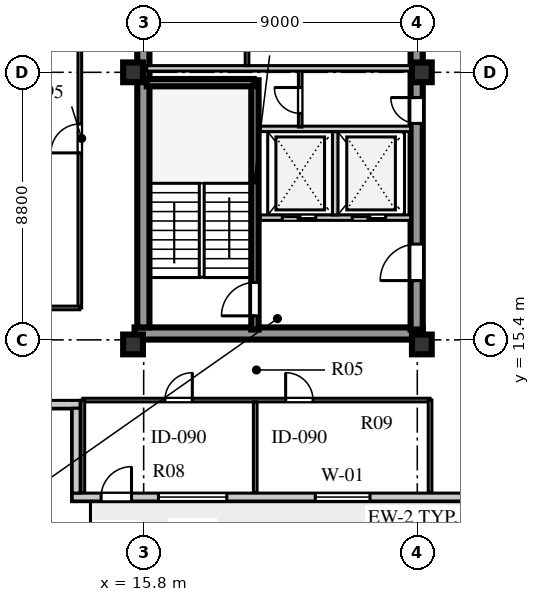
"""IFC4 building model, lengths in metres.
Left out: names, types, materials, properties, quantities, classifications, styles, units other than length and angle.
Written with IfcOpenShell. Run it as: python <this file> out.ifc"""

import sys

from ifc_helpers import new_model, si_unit, direction, frame, frame_2d, origin, origin_2d, place, context, subcontext, project, spatial, rectangle, extrude, element, fill, save


model = new_model("IFC4")
c1 = context("Model", 3, precision=1e-05, world=origin(), true_north=direction((0.0, 1.0)))
c2 = subcontext(c1, "Body", "Model", "MODEL_VIEW")
j1 = project(units=[si_unit("LENGTHUNIT", "METRE"), si_unit("PLANEANGLEUNIT", "RADIAN")], contexts=[c1])
p1 = place(None, origin())
s1 = spatial("IfcSite", under=j1, at=p1, CompositionType="ELEMENT")
p2 = place(p1, origin())
s2 = spatial("IfcBuilding", under=s1, at=p2, CompositionType="ELEMENT")
p3 = place(p2, frame((0.0, 0.0, 288.2)))
s3 = spatial("IfcBuildingStorey", under=s2, at=p3, CompositionType="ELEMENT", Elevation=288.2)
p4 = place(p3, frame((15.5, 15.61, 0.0), z_axis=(0.0, 0.0, 1.0), x_axis=(1.0, 0.0, 0.0)))
e1 = element("IfcWall", 1, at=p4, inside=s3, PredefinedType="SHEAR", context=c2, shape_type="SweptSolid", body=[
    extrude(rectangle(XDim=9.48, YDim=0.4, at=frame_2d((4.74, 0.0))), origin(), (0.0, 0.0, 1.0), 3.66),
])
p5 = place(p3, frame((15.79, 15.81, 0.0), z_axis=(0.0, 0.0, 1.0), x_axis=(0.0, 1.0, 0.0)))
e2 = element("IfcWall", 2, at=p5, inside=s3, PredefinedType="SHEAR", context=c2, shape_type="SweptSolid", body=[
    extrude(rectangle(XDim=25.63, YDim=0.4, at=frame_2d((12.815, 0.0))), origin(), (0.0, 0.0, 1.0), 3.66),
])
p6 = place(p3, frame((24.78, 15.74, 0.0), z_axis=(0.0, 0.0, 1.0), x_axis=(0.0, 1.0, 0.0)))
e3 = element("IfcWall", 3, at=p6, inside=s3, PredefinedType="SHEAR", context=c2, shape_type="SweptSolid", body=[
    extrude(rectangle(XDim=25.76, YDim=0.4, at=frame_2d((12.88, 0.0))), origin(), (0.0, 0.0, 1.0), 3.66),
])
p7 = place(p6, frame((1.61, 0.0, 0.0)))
e4 = element("IfcOpeningElement", 4, at=p7, cuts=e3, PredefinedType="OPENING", context=c2, shape_type="SweptSolid", body=[
    extrude(rectangle(XDim=1.2, YDim=2.1, at=frame_2d((0.6, 1.05))), frame((0.0, 0.21, 0.0), z_axis=(0.0, -1.0, 0.0), x_axis=(1.0, 0.0, 0.0)), (0.0, 0.0, 1.0), 0.42),
])
p8 = place(p6, frame((6.78, 0.0, 0.0)))
e5 = element("IfcOpeningElement", 5, at=p8, cuts=e3, PredefinedType="OPENING", context=c2, shape_type="SweptSolid", body=[
    extrude(rectangle(XDim=0.85, YDim=2.06, at=frame_2d((0.425, 1.03))), frame((0.0, 0.21, 0.0), z_axis=(0.0, -1.0, 0.0), x_axis=(1.0, 0.0, 0.0)), (0.0, 0.0, 1.0), 0.42),
])
p9 = place(p6, frame((12.11, 0.0, 0.0)))
e6 = element("IfcOpeningElement", 6, at=p9, cuts=e3, PredefinedType="OPENING", context=c2, shape_type="SweptSolid", body=[
    extrude(rectangle(XDim=1.5, YDim=2.12, at=frame_2d((0.75, 1.06))), frame((0.0, 0.21, 0.0), z_axis=(0.0, -1.0, 0.0), x_axis=(1.0, 0.0, 0.0)), (0.0, 0.0, 1.0), 0.42),
])
p10 = place(p6, frame((20.11, 0.0, 0.0)))
e7 = element("IfcOpeningElement", 7, at=p10, cuts=e3, PredefinedType="OPENING", context=c2, shape_type="SweptSolid", body=[
    extrude(rectangle(XDim=1.2, YDim=2.12, at=frame_2d((0.6, 1.06))), frame((0.0, 0.21, 0.0), z_axis=(0.0, -1.0, 0.0), x_axis=(1.0, 0.0, 0.0)), (0.0, 0.0, 1.0), 0.42),
])
p11 = place(p6, frame((24.01, 0.0, 0.0)))
e8 = element("IfcOpeningElement", 8, at=p11, cuts=e3, PredefinedType="OPENING", context=c2, shape_type="SweptSolid", body=[
    extrude(rectangle(XDim=0.95, YDim=2.1, at=frame_2d((0.475, 1.05))), frame((0.0, 0.21, 0.0), z_axis=(0.0, -1.0, 0.0), x_axis=(1.0, 0.0, 0.0)), (0.0, 0.0, 1.0), 0.42),
])
for number, where, z_axis, x_axis in (
    (9, (15.45, 15.25, 0.0), (0.0, 0.0, 1.0), (1.0, 0.0, 0.0)),
    (10, (15.45, 24.2, 0.0), (0.0, 0.0, 1.0), (1.0, 0.0, 0.0)),
    (11, (24.95, 15.25, 0.0), (0.0, 0.0, 1.0), (1.0, 0.0, 0.0)),
    (12, (24.95, 24.2, 0.0), (0.0, 0.0, 1.0), (1.0, 0.0, 0.0)),
):
    element("IfcColumn", number, at=place(p3, frame(where, z_axis=z_axis, x_axis=x_axis)), inside=s3, PredefinedType="COLUMN", context=c2, shape_type="SweptSolid", body=[
        extrude(rectangle(XDim=0.65, YDim=0.65, at=origin_2d()), origin(), (0.0, 0.0, 1.0), 3.66),
    ])
p12 = place(p3, frame((13.45, 10.23, 0.0), z_axis=(0.0, 0.0, 1.0), x_axis=(1.0, 0.0, 0.0)))
e13 = element("IfcWall", 13, at=p12, inside=s3, PredefinedType="SOLIDWALL", context=c2, shape_type="SweptSolid", body=[
    extrude(rectangle(XDim=31.7, YDim=0.26, at=frame_2d((15.85, 0.0))), origin(), (0.0, 0.0, 1.0), 3.66),
])
p13 = place(p12, frame((0.95, 0.0, 0.0)))
e14 = element("IfcOpeningElement", 14, at=p13, cuts=e13, PredefinedType="OPENING", context=c2, shape_type="SweptSolid", body=[
    extrude(rectangle(XDim=1.0, YDim=2.05, at=frame_2d((0.5, 1.025))), frame((0.0, 0.14, 0.0), z_axis=(0.0, -1.0, 0.0), x_axis=(1.0, 0.0, 0.0)), (0.0, 0.0, 1.0), 0.28),
])
p14 = place(p12, frame((2.835, 0.0, 0.8)))
e15 = element("IfcOpeningElement", 15, at=p14, cuts=e13, PredefinedType="OPENING", context=c2, shape_type="SweptSolid", body=[
    extrude(rectangle(XDim=2.25, YDim=2.0, at=frame_2d((1.125, 1.0))), frame((0.0, 0.14, 0.0), z_axis=(0.0, -1.0, 0.0), x_axis=(1.0, 0.0, 0.0)), (0.0, 0.0, 1.0), 0.28),
])
p15 = place(p12, frame((7.995, 0.0, 0.8)))
e16 = element("IfcOpeningElement", 16, at=p15, cuts=e13, PredefinedType="OPENING", context=c2, shape_type="SweptSolid", body=[
    extrude(rectangle(XDim=1.8, YDim=2.0, at=frame_2d((0.9, 1.0))), frame((0.0, 0.14, 0.0), z_axis=(0.0, -1.0, 0.0), x_axis=(1.0, 0.0, 0.0)), (0.0, 0.0, 1.0), 0.28),
])
p16 = place(p12, frame((15.073, 0.0, 0.8)))
e17 = element("IfcOpeningElement", 17, at=p16, cuts=e13, PredefinedType="OPENING", context=c2, shape_type="SweptSolid", body=[
    extrude(rectangle(XDim=1.5, YDim=2.0, at=frame_2d((0.75, 1.0))), frame((0.0, 0.14, 0.0), z_axis=(0.0, -1.0, 0.0), x_axis=(1.0, 0.0, 0.0)), (0.0, 0.0, 1.0), 0.28),
])
p17 = place(p12, frame((21.258, 0.0, 0.8)))
e18 = element("IfcOpeningElement", 18, at=p17, cuts=e13, PredefinedType="OPENING", context=c2, shape_type="SweptSolid", body=[
    extrude(rectangle(XDim=1.2, YDim=1.75, at=frame_2d((0.6, 0.875))), frame((0.0, 0.14, 0.0), z_axis=(0.0, -1.0, 0.0), x_axis=(1.0, 0.0, 0.0)), (0.0, 0.0, 1.0), 0.28),
])
p18 = place(p12, frame((27.445, 0.0, 0.8)))
e19 = element("IfcOpeningElement", 19, at=p18, cuts=e13, PredefinedType="OPENING", context=c2, shape_type="SweptSolid", body=[
    extrude(rectangle(XDim=2.4, YDim=2.05, at=frame_2d((1.2, 1.025))), frame((0.0, 0.14, 0.0), z_axis=(0.0, -1.0, 0.0), x_axis=(1.0, 0.0, 0.0)), (0.0, 0.0, 1.0), 0.28),
])
p19 = place(p3, frame((10.4, 13.28, 0.0), z_axis=(0.0, 0.0, 1.0), x_axis=(1.0, 0.0, 0.0)))
e20 = element("IfcWall", 20, at=p19, inside=s3, PredefinedType="SOLIDWALL", context=c2, shape_type="SweptSolid", body=[
    extrude(rectangle(XDim=3.31, YDim=0.26, at=frame_2d((1.655, 0.0))), origin(), (0.0, 0.0, 1.0), 3.66),
])
p20 = place(p3, frame((13.58, 13.15, 0.0), z_axis=(0.0, 0.0, 1.0), x_axis=(0.0, -1.0, 0.0)))
e21 = element("IfcWall", 21, at=p20, inside=s3, PredefinedType="SOLIDWALL", context=c2, shape_type="SweptSolid", body=[
    extrude(rectangle(XDim=2.79, YDim=0.26, at=frame_2d((1.395, 0.0))), origin(), (0.0, 0.0, 1.0), 3.66),
])
p21 = place(p3, frame((19.46, 15.74, 0.0), z_axis=(0.0, 0.0, 1.0), x_axis=(0.0, 1.0, 0.0)))
e22 = element("IfcWall", 22, at=p21, inside=s3, PredefinedType="SHEAR", context=c2, shape_type="SweptSolid", body=[
    extrude(rectangle(XDim=8.2, YDim=0.24, at=frame_2d((4.1, 0.0))), origin(), (0.0, 0.0, 1.0), 3.9),
])
p22 = place(p21, frame((0.45, 0.0, 0.0)))
e23 = element("IfcOpeningElement", 23, at=p22, cuts=e22, PredefinedType="OPENING", context=c2, shape_type="SweptSolid", body=[
    extrude(rectangle(XDim=1.1, YDim=2.1, at=frame_2d((0.55, 1.05))), frame((0.0, 0.13, 0.0), z_axis=(0.0, -1.0, 0.0), x_axis=(1.0, 0.0, 0.0)), (0.0, 0.0, 1.0), 0.26),
])
p23 = place(p3, frame((15.9, 23.86, 0.0), z_axis=(0.0, 0.0, 1.0), x_axis=(1.0, 0.0, 0.0)))
e24 = element("IfcWall", 24, at=p23, inside=s3, PredefinedType="SHEAR", context=c2, shape_type="SweptSolid", body=[
    extrude(rectangle(XDim=3.52, YDim=0.24, at=frame_2d((1.76, 0.0))), origin(), (0.0, 0.0, 1.0), 3.9),
])
p24 = place(p3, frame((19.64, 19.42, 0.0), z_axis=(0.0, 0.0, 1.0), x_axis=(1.0, 0.0, 0.0)))
e25 = element("IfcWall", 25, at=p24, inside=s3, PredefinedType="SOLIDWALL", context=c2, shape_type="SweptSolid", body=[
    extrude(rectangle(XDim=4.94, YDim=0.18, at=frame_2d((2.47, 0.0))), origin(), (0.0, 0.0, 1.0), 3.66),
])
p25 = place(p24, frame((0.72, 0.0, 0.0)))
e26 = element("IfcOpeningElement", 26, at=p25, cuts=e25, PredefinedType="OPENING", context=c2, shape_type="SweptSolid", body=[
    extrude(rectangle(XDim=1.1, YDim=2.1, at=frame_2d((0.55, 1.05))), frame((0.0, 0.1, 0.0), z_axis=(0.0, -1.0, 0.0), x_axis=(1.0, 0.0, 0.0)), (0.0, 0.0, 1.0), 0.2),
])
p26 = place(p24, frame((3.02, 0.0, 0.0)))
e27 = element("IfcOpeningElement", 27, at=p26, cuts=e25, PredefinedType="OPENING", context=c2, shape_type="SweptSolid", body=[
    extrude(rectangle(XDim=1.1, YDim=2.1, at=frame_2d((0.55, 1.05))), frame((0.0, 0.1, 0.0), z_axis=(0.0, -1.0, 0.0), x_axis=(1.0, 0.0, 0.0)), (0.0, 0.0, 1.0), 0.2),
])
p27 = place(p3, frame((22.1, 19.51, 0.0), z_axis=(0.0, 0.0, 1.0), x_axis=(0.0, 1.0, 0.0)))
e28 = element("IfcWall", 28, at=p27, inside=s3, PredefinedType="SOLIDWALL", context=c2, shape_type="SweptSolid", body=[
    extrude(rectangle(XDim=2.74, YDim=0.18, at=frame_2d((1.37, 0.0))), origin(), (0.0, 0.0, 1.0), 3.66),
])
p28 = place(p3, frame((19.64, 22.34, 0.0), z_axis=(0.0, 0.0, 1.0), x_axis=(1.0, 0.0, 0.0)))
e29 = element("IfcWall", 29, at=p28, inside=s3, PredefinedType="SOLIDWALL", context=c2, shape_type="SweptSolid", body=[
    extrude(rectangle(XDim=4.94, YDim=0.18, at=frame_2d((2.47, 0.0))), origin(), (0.0, 0.0, 1.0), 3.66),
])
p29 = place(p3, frame((20.95, 22.4, 0.0), z_axis=(0.0, 0.0, 1.0), x_axis=(0.0, 1.0, 0.0)))
e30 = element("IfcWall", 30, at=p29, inside=s3, PredefinedType="PARTITIONING", context=c2, shape_type="SweptSolid", body=[
    extrude(rectangle(XDim=1.88, YDim=0.12, at=frame_2d((0.94, 0.0))), origin(), (0.0, 0.0, 1.0), 3.66),
])
p30 = place(p29, frame((0.45, 0.0, 0.0)))
e31 = element("IfcOpeningElement", 31, at=p30, cuts=e30, PredefinedType="OPENING", context=c2, shape_type="SweptSolid", body=[
    extrude(rectangle(XDim=0.85, YDim=2.06, at=frame_2d((0.425, 1.03))), frame((0.0, 0.07, 0.0), z_axis=(0.0, -1.0, 0.0), x_axis=(1.0, 0.0, 0.0)), (0.0, 0.0, 1.0), 0.14),
])
p31 = place(p3, frame((15.9, 24.33, 0.0), z_axis=(0.0, 0.0, 1.0), x_axis=(1.0, 0.0, 0.0)))
e32 = element("IfcWall", 32, at=p31, inside=s3, PredefinedType="SOLIDWALL", context=c2, shape_type="SweptSolid", body=[
    extrude(rectangle(XDim=8.68, YDim=0.18, at=frame_2d((4.34, 0.0))), origin(), (0.0, 0.0, 1.0), 3.06),
])
p32 = place(p3, frame((19.2, 24.42, 0.0), z_axis=(0.0, 0.0, 1.0), x_axis=(0.0, 1.0, 0.0)))
e33 = element("IfcWall", 33, at=p32, inside=s3, PredefinedType="PARTITIONING", context=c2, shape_type="SweptSolid", body=[
    extrude(rectangle(XDim=2.02, YDim=0.12, at=frame_2d((1.01, 0.0))), origin(), (0.0, 0.0, 1.0), 3.66),
])
p33 = place(p3, frame((13.8, 13.42, 0.0), z_axis=(0.0, 0.0, 1.0), x_axis=(1.0, 0.0, 0.0)))
e34 = element("IfcWall", 34, at=p33, inside=s3, PredefinedType="PARTITIONING", context=c2, shape_type="SweptSolid", body=[
    extrude(rectangle(XDim=11.42, YDim=0.12, at=frame_2d((5.71, 0.0))), origin(), (0.0, 0.0, 1.0), 3.66),
])
p34 = place(p33, frame((2.7, 0.0, 0.0)))
e35 = element("IfcOpeningElement", 35, at=p34, cuts=e34, PredefinedType="OPENING", context=c2, shape_type="SweptSolid", body=[
    extrude(rectangle(XDim=0.9, YDim=2.08, at=frame_2d((0.45, 1.04))), frame((0.0, 0.07, 0.0), z_axis=(0.0, -1.0, 0.0), x_axis=(1.0, 0.0, 0.0)), (0.0, 0.0, 1.0), 0.14),
])
p35 = place(p33, frame((6.67, 0.0, 0.0)))
e36 = element("IfcOpeningElement", 36, at=p35, cuts=e34, PredefinedType="OPENING", context=c2, shape_type="SweptSolid", body=[
    extrude(rectangle(XDim=0.9, YDim=2.08, at=frame_2d((0.45, 1.04))), frame((0.0, 0.07, 0.0), z_axis=(0.0, -1.0, 0.0), x_axis=(1.0, 0.0, 0.0)), (0.0, 0.0, 1.0), 0.14),
])
p36 = place(p3, frame((13.8, 10.38, 0.0), z_axis=(0.0, 0.0, 1.0), x_axis=(0.0, 1.0, 0.0)))
e37 = element("IfcWall", 37, at=p36, inside=s3, PredefinedType="PARTITIONING", context=c2, shape_type="SweptSolid", body=[
    extrude(rectangle(XDim=3.04, YDim=0.12, at=frame_2d((1.52, 0.0))), origin(), (0.0, 0.0, 1.0), 3.66),
])
p37 = place(p3, frame((25.22, 10.38, 0.0), z_axis=(0.0, 0.0, 1.0), x_axis=(0.0, 1.0, 0.0)))
e38 = element("IfcWall", 38, at=p37, inside=s3, PredefinedType="PARTITIONING", context=c2, shape_type="SweptSolid", body=[
    extrude(rectangle(XDim=3.04, YDim=0.12, at=frame_2d((1.52, 0.0))), origin(), (0.0, 0.0, 1.0), 3.21),
])
p38 = place(p3, frame((19.47, 10.38, 0.0), z_axis=(0.0, 0.0, 1.0), x_axis=(0.0, 1.0, 0.0)))
e39 = element("IfcWall", 39, at=p38, inside=s3, PredefinedType="PARTITIONING", context=c2, shape_type="SweptSolid", body=[
    extrude(rectangle(XDim=2.98, YDim=0.12, at=frame_2d((1.49, 0.0))), origin(), (0.0, 0.0, 1.0), 3.66),
])
p39 = place(p3, frame((13.7, 16.45, 0.0), z_axis=(0.0, 0.0, 1.0), x_axis=(0.0, 1.0, 0.0)))
e40 = element("IfcWall", 40, at=p39, inside=s3, PredefinedType="PARTITIONING", context=c2, shape_type="SweptSolid", body=[
    extrude(rectangle(XDim=24.3, YDim=0.12, at=frame_2d((12.15, 0.0))), origin(), (0.0, 0.0, 1.0), 3.66),
])
p40 = place(p39, frame((5.1, 0.0, 0.0)))
e41 = element("IfcOpeningElement", 41, at=p40, cuts=e40, PredefinedType="OPENING", context=c2, shape_type="SweptSolid", body=[
    extrude(rectangle(XDim=0.95, YDim=2.08, at=frame_2d((0.475, 1.04))), frame((0.0, 0.07, 0.0), z_axis=(0.0, -1.0, 0.0), x_axis=(1.0, 0.0, 0.0)), (0.0, 0.0, 1.0), 0.14),
])
p41 = place(p3, frame((10.68, 16.45, 0.0), z_axis=(0.0, 0.0, 1.0), x_axis=(1.0, 0.0, 0.0)))
e42 = element("IfcWall", 42, at=p41, inside=s3, PredefinedType="PARTITIONING", context=c2, shape_type="SweptSolid", body=[
    extrude(rectangle(XDim=3.02, YDim=0.12, at=frame_2d((1.51, 0.0))), origin(), (0.0, 0.0, 1.0), 3.66),
])
p42 = place(p13, frame((1.0, 0.0, 0.0), z_axis=(0.0, 0.0, 1.0), x_axis=(-1.0, 0.0, 0.0)))
e43 = element("IfcDoor", 43, at=p42, inside=s3, OperationType="SINGLE_SWING_LEFT", PredefinedType="DOOR", context=c2, shape_type="SweptSolid", body=[
    extrude(rectangle(XDim=1.0, YDim=2.05, at=frame_2d((0.5, 1.025))), frame((0.0, 0.025, 0.0), z_axis=(0.0, -1.0, 0.0), x_axis=(1.0, 0.0, 0.0)), (0.0, 0.0, 1.0), 0.05),
])
fill(e14, e43)
p43 = place(p14, origin())
e44 = element("IfcWindow", 44, at=p43, inside=s3, PartitioningType="SINGLE_PANEL", PredefinedType="WINDOW", context=c2, shape_type="SweptSolid", body=[
    extrude(rectangle(XDim=2.25, YDim=2.0, at=frame_2d((1.125, 1.0))), frame((0.0, 0.03, 0.0), z_axis=(0.0, -1.0, 0.0), x_axis=(1.0, 0.0, 0.0)), (0.0, 0.0, 1.0), 0.06),
])
fill(e15, e44)
p44 = place(p15, origin())
e45 = element("IfcWindow", 45, at=p44, inside=s3, PartitioningType="SINGLE_PANEL", PredefinedType="WINDOW", context=c2, shape_type="SweptSolid", body=[
    extrude(rectangle(XDim=1.8, YDim=2.0, at=frame_2d((0.9, 1.0))), frame((0.0, 0.03, 0.0), z_axis=(0.0, -1.0, 0.0), x_axis=(1.0, 0.0, 0.0)), (0.0, 0.0, 1.0), 0.06),
])
fill(e16, e45)
p45 = place(p22, origin())
e46 = element("IfcDoor", 46, at=p45, inside=s3, OperationType="SINGLE_SWING_LEFT", PredefinedType="DOOR", context=c2, shape_type="SweptSolid", body=[
    extrude(rectangle(XDim=1.1, YDim=2.1, at=frame_2d((0.55, 1.05))), frame((0.0, 0.025, 0.0), z_axis=(0.0, -1.0, 0.0), x_axis=(1.0, 0.0, 0.0)), (0.0, 0.0, 1.0), 0.05),
])
fill(e23, e46)
p46 = place(p25, origin())
e47 = element("IfcDoor", 47, at=p46, inside=s3, OperationType="DOUBLE_DOOR_SLIDING", PredefinedType="DOOR", context=c2, shape_type="SweptSolid", body=[
    extrude(rectangle(XDim=1.1, YDim=2.1, at=frame_2d((0.55, 1.05))), frame((0.0, 0.025, 0.0), z_axis=(0.0, -1.0, 0.0), x_axis=(1.0, 0.0, 0.0)), (0.0, 0.0, 1.0), 0.05),
])
fill(e26, e47)
p47 = place(p26, origin())
e48 = element("IfcDoor", 48, at=p47, inside=s3, OperationType="DOUBLE_DOOR_SLIDING", PredefinedType="DOOR", context=c2, shape_type="SweptSolid", body=[
    extrude(rectangle(XDim=1.1, YDim=2.1, at=frame_2d((0.55, 1.05))), frame((0.0, 0.025, 0.0), z_axis=(0.0, -1.0, 0.0), x_axis=(1.0, 0.0, 0.0)), (0.0, 0.0, 1.0), 0.05),
])
fill(e27, e48)
p48 = place(p7, frame((1.2, 0.0, 0.0), z_axis=(0.0, 0.0, 1.0), x_axis=(-1.0, 0.0, 0.0)))
e49 = element("IfcDoor", 49, at=p48, inside=s3, OperationType="SINGLE_SWING_RIGHT", PredefinedType="DOOR", context=c2, shape_type="SweptSolid", body=[
    extrude(rectangle(XDim=1.2, YDim=2.1, at=frame_2d((0.6, 1.05))), frame((0.0, 0.025, 0.0), z_axis=(0.0, -1.0, 0.0), x_axis=(1.0, 0.0, 0.0)), (0.0, 0.0, 1.0), 0.05),
])
fill(e4, e49)
p49 = place(p30, origin())
e50 = element("IfcDoor", 50, at=p49, inside=s3, OperationType="SINGLE_SWING_RIGHT", PredefinedType="DOOR", context=c2, shape_type="SweptSolid", body=[
    extrude(rectangle(XDim=0.85, YDim=2.06, at=frame_2d((0.425, 1.03))), frame((0.0, 0.025, 0.0), z_axis=(0.0, -1.0, 0.0), x_axis=(1.0, 0.0, 0.0)), (0.0, 0.0, 1.0), 0.05),
])
fill(e31, e50)
p50 = place(p8, frame((0.85, 0.0, 0.0), z_axis=(0.0, 0.0, 1.0), x_axis=(-1.0, 0.0, 0.0)))
e51 = element("IfcDoor", 51, at=p50, inside=s3, OperationType="SINGLE_SWING_LEFT", PredefinedType="DOOR", context=c2, shape_type="SweptSolid", body=[
    extrude(rectangle(XDim=0.85, YDim=2.06, at=frame_2d((0.425, 1.03))), frame((0.0, 0.025, 0.0), z_axis=(0.0, -1.0, 0.0), x_axis=(1.0, 0.0, 0.0)), (0.0, 0.0, 1.0), 0.05),
])
fill(e5, e51)
p51 = place(p34, frame((0.9, 0.0, 0.0), z_axis=(0.0, 0.0, 1.0), x_axis=(-1.0, 0.0, 0.0)))
e52 = element("IfcDoor", 52, at=p51, inside=s3, OperationType="SINGLE_SWING_LEFT", PredefinedType="DOOR", context=c2, shape_type="SweptSolid", body=[
    extrude(rectangle(XDim=0.9, YDim=2.08, at=frame_2d((0.45, 1.04))), frame((0.0, 0.025, 0.0), z_axis=(0.0, -1.0, 0.0), x_axis=(1.0, 0.0, 0.0)), (0.0, 0.0, 1.0), 0.05),
])
fill(e35, e52)
p52 = place(p35, frame((0.9, 0.0, 0.0), z_axis=(0.0, 0.0, 1.0), x_axis=(-1.0, 0.0, 0.0)))
e53 = element("IfcDoor", 53, at=p52, inside=s3, OperationType="SINGLE_SWING_RIGHT", PredefinedType="DOOR", context=c2, shape_type="SweptSolid", body=[
    extrude(rectangle(XDim=0.9, YDim=2.08, at=frame_2d((0.45, 1.04))), frame((0.0, 0.025, 0.0), z_axis=(0.0, -1.0, 0.0), x_axis=(1.0, 0.0, 0.0)), (0.0, 0.0, 1.0), 0.05),
])
fill(e36, e53)
p53 = place(p40, origin())
e54 = element("IfcDoor", 54, at=p53, inside=s3, OperationType="SINGLE_SWING_LEFT", PredefinedType="DOOR", context=c2, shape_type="SweptSolid", body=[
    extrude(rectangle(XDim=0.95, YDim=2.08, at=frame_2d((0.475, 1.04))), frame((0.0, 0.025, 0.0), z_axis=(0.0, -1.0, 0.0), x_axis=(1.0, 0.0, 0.0)), (0.0, 0.0, 1.0), 0.05),
])
fill(e41, e54)
save(model, sys.argv[1])
